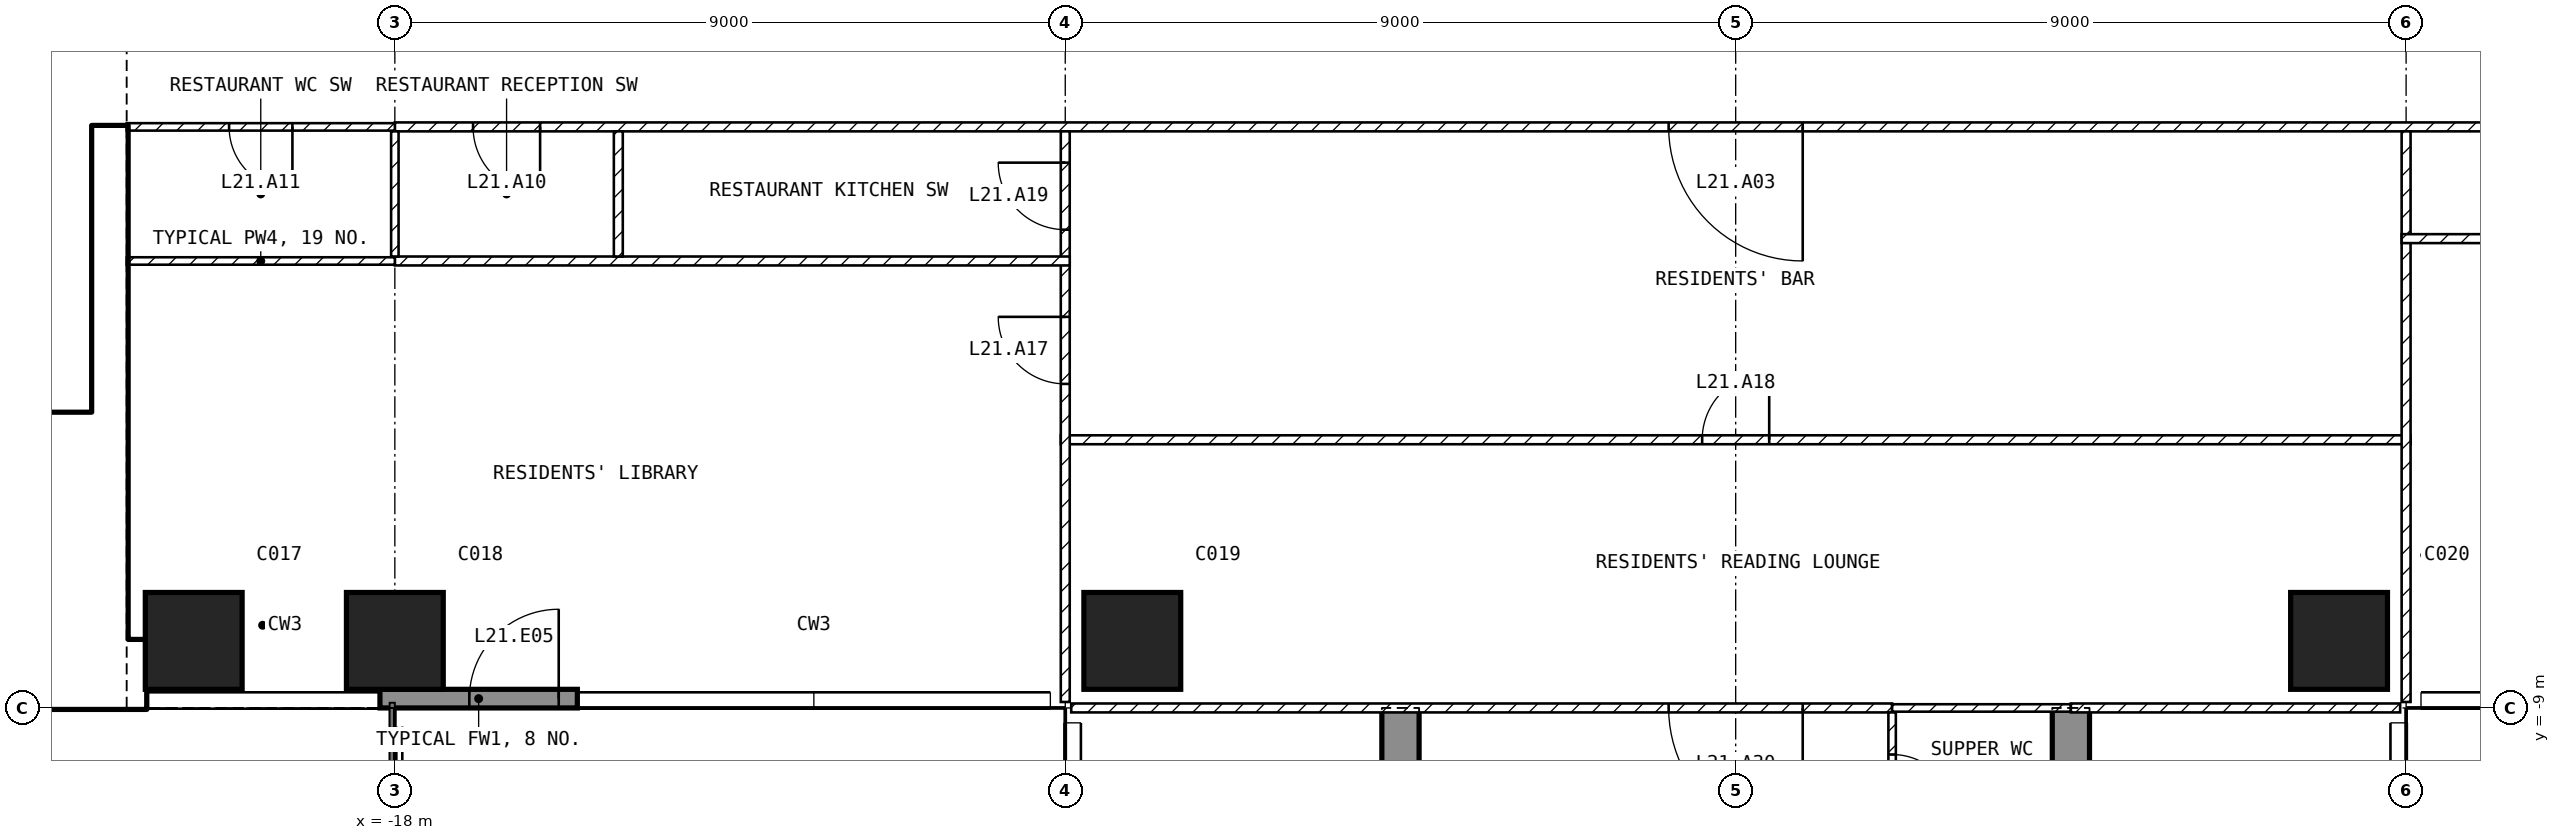
"""IFC4 building model, lengths in metres.
Left out: names, types, materials, properties, quantities, classifications, styles, units other than length and angle.
Written with IfcOpenShell. Run it as: python <this file> out.ifc"""

import sys

from ifc_helpers import new_model, si_unit, direction, frame, frame_2d, origin, origin_2d, place, context, subcontext, project, spatial, polyline, rectangle, outline, extrude, element, fill, save


model = new_model("IFC4")
c1 = context("Model", 3, precision=1e-05, world=origin(), true_north=direction((0.0, 1.0)))
c2 = subcontext(c1, "Body", "Model", "MODEL_VIEW")
j1 = project(units=[si_unit("LENGTHUNIT", "METRE"), si_unit("PLANEANGLEUNIT", "RADIAN")], contexts=[c1])
p1 = place(None, origin())
s1 = spatial("IfcSite", under=j1, at=p1, CompositionType="ELEMENT")
p2 = place(p1, origin())
s2 = spatial("IfcBuilding", under=s1, at=p2, CompositionType="ELEMENT")
p3 = place(p2, frame((0.0, 0.0, 92.5)))
s3 = spatial("IfcBuildingStorey", under=s2, at=p3, CompositionType="ELEMENT", Elevation=92.5)
for number, where, z_axis, x_axis in (
    (1, (-20.7, -8.1, -0.3), (0.0, 0.0, 1.0), (1.0, 0.0, 0.0)),
    (2, (-18.0, -8.1, -0.3), (0.0, 0.0, 1.0), (1.0, 0.0, 0.0)),
    (3, (-8.1, -8.1, -0.3), (0.0, 0.0, 1.0), (1.0, 0.0, 0.0)),
    (4, (8.1, -8.1, -0.3), (0.0, 0.0, 1.0), (1.0, 0.0, 0.0)),
):
    element("IfcColumn", number, at=place(p3, frame(where, z_axis=z_axis, x_axis=x_axis)), inside=s3, PredefinedType="COLUMN", context=c2, shape_type="SweptSolid", body=[
        extrude(rectangle(XDim=1.3, YDim=1.3, at=origin_2d()), origin(), (0.0, 0.0, 1.0), 5.25),
    ])
for number, where, z_axis, x_axis in (
    (5, (-4.75, -25.45, -0.3), (1.0, 0.0, 0.0), (0.0, 1.0, 0.0)),
    (6, (4.25, -25.45, -0.3), (1.0, 0.0, 0.0), (0.0, 1.0, 0.0)),
):
    element("IfcWall", number, at=place(p3, frame(where, z_axis=z_axis, x_axis=x_axis)), inside=s3, PredefinedType="SHEAR", context=c2, shape_type="SweptSolid", body=[
        extrude(outline(polyline([(0.0, 0.0), (4.15, 0.0), (4.15, 2.7), (6.55, 2.7), (6.55, 0.0), (11.95, 0.0), (11.95, 2.7), (14.35, 2.7), (14.35, 0.0), (16.45, 0.0), (16.45, 5.25), (0.0, 5.25), (0.0, 0.0)])), origin(), (0.0, 0.0, 1.0), 0.5),
    ])
p4 = place(p3, frame((-18.2, -8.875, 0.0), z_axis=(0.0, 0.0, 1.0), x_axis=(1.0, 0.0, 0.0)))
e7 = element("IfcWall", 7, at=p4, inside=s3, PredefinedType="SOLIDWALL", context=c2, shape_type="SweptSolid", body=[
    extrude(rectangle(XDim=2.65, YDim=0.25, at=frame_2d((1.325, 0.0))), origin(), (0.0, 0.0, 1.0), 4.95),
])
p5 = place(p4, frame((1.2, 0.0, 0.0)))
e8 = element("IfcOpeningElement", 8, at=p5, cuts=e7, PredefinedType="OPENING", context=c2, shape_type="SweptSolid", body=[
    extrude(rectangle(XDim=1.2, YDim=2.4, at=frame_2d((0.6, 1.2))), frame((0.0, 0.135, 0.0), z_axis=(0.0, -1.0, 0.0), x_axis=(1.0, 0.0, 0.0)), (0.0, 0.0, 1.0), 0.27),
])
p6 = place(p3, frame((-32.4, -8.55, 0.0), z_axis=(0.0, 0.0, 1.0), x_axis=(1.0, 0.0, 0.0)))
e9 = element("IfcWall", 9, at=p6, inside=s3, PredefinedType="SHEAR", context=c2, shape_type="SweptSolid", body=[
    extrude(rectangle(XDim=11.05, YDim=0.9, at=frame_2d((5.525, 0.0))), origin(), (0.0, 0.0, 1.0), 4.95),
])
p7 = place(p3, frame((-21.825, -8.1, 0.0), z_axis=(0.0, 0.0, 1.0), x_axis=(0.0, 1.0, 0.0)))
e10 = element("IfcWall", 10, at=p7, inside=s3, PredefinedType="SHEAR", context=c2, shape_type="SweptSolid", body=[
    extrude(rectangle(XDim=6.9, YDim=0.45, at=frame_2d((3.45, 0.0))), origin(), (0.0, 0.0, 1.0), 4.95),
])
p8 = place(p3, frame((-28.35, -5.15, 0.0), z_axis=(0.0, 0.0, 1.0), x_axis=(1.0, 0.0, 0.0)))
e11 = element("IfcWall", 11, at=p8, inside=s3, PredefinedType="SOLIDWALL", context=c2, shape_type="SweptSolid", body=[
    extrude(rectangle(XDim=6.3, YDim=0.2, at=frame_2d((3.15, 0.0))), origin(), (0.0, 0.0, 1.0), 4.95),
])
p9 = place(p8, frame((5.1, 0.0, 0.0)))
e12 = element("IfcOpeningElement", 12, at=p9, cuts=e11, PredefinedType="OPENING", context=c2, shape_type="SweptSolid", body=[
    extrude(rectangle(XDim=1.0, YDim=2.1, at=frame_2d((0.5, 1.05))), frame((0.0, 0.11, 0.0), z_axis=(0.0, -1.0, 0.0), x_axis=(1.0, 0.0, 0.0)), (0.0, 0.0, 1.0), 0.22),
])
p10 = place(p3, frame((18.0, -1.2, 0.0), z_axis=(0.0, 0.0, 1.0), x_axis=(-1.0, 0.0, 0.0)))
e13 = element("IfcWall", 13, at=p10, inside=s3, PredefinedType="PARTITIONING", context=c2, shape_type="SweptSolid", body=[
    extrude(rectangle(XDim=36.0, YDim=0.12, at=frame_2d((18.0, 0.0))), origin(), (0.0, 0.0, 1.0), 4.95),
])
p11 = place(p10, frame((17.1, 0.0, 0.0)))
e14 = element("IfcOpeningElement", 14, at=p11, cuts=e13, PredefinedType="OPENING", context=c2, shape_type="SweptSolid", body=[
    extrude(rectangle(XDim=1.8, YDim=2.1, at=frame_2d((0.9, 1.05))), frame((0.0, 0.07, 0.0), z_axis=(0.0, -1.0, 0.0), x_axis=(1.0, 0.0, 0.0)), (0.0, 0.0, 1.0), 0.14),
])
p12 = place(p10, frame((5.25, 0.0, 0.0)))
e15 = element("IfcOpeningElement", 15, at=p12, cuts=e13, PredefinedType="OPENING", context=c2, shape_type="SweptSolid", body=[
    extrude(rectangle(XDim=0.9, YDim=2.1, at=frame_2d((0.45, 1.05))), frame((0.0, 0.07, 0.0), z_axis=(0.0, -1.0, 0.0), x_axis=(1.0, 0.0, 0.0)), (0.0, 0.0, 1.0), 0.14),
])
p13 = place(p10, frame((34.05, 0.0, 0.0)))
e16 = element("IfcOpeningElement", 16, at=p13, cuts=e13, PredefinedType="OPENING", context=c2, shape_type="SweptSolid", body=[
    extrude(rectangle(XDim=0.9, YDim=2.1, at=frame_2d((0.45, 1.05))), frame((0.0, 0.07, 0.0), z_axis=(0.0, -1.0, 0.0), x_axis=(1.0, 0.0, 0.0)), (0.0, 0.0, 1.0), 0.14),
])
p14 = place(p3, frame((-18.0, -1.2, 0.0), z_axis=(0.0, 0.0, 1.0), x_axis=(-1.0, 0.0, 0.0)))
e17 = element("IfcWall", 17, at=p14, inside=s3, PredefinedType="PARTITIONING", context=c2, shape_type="SweptSolid", body=[
    extrude(rectangle(XDim=3.6, YDim=0.1, at=frame_2d((1.8, 0.0))), origin(), (0.0, 0.0, 1.0), 4.95),
])
p15 = place(p14, frame((1.375, 0.0, 0.0)))
e18 = element("IfcOpeningElement", 18, at=p15, cuts=e17, PredefinedType="OPENING", context=c2, shape_type="SweptSolid", body=[
    extrude(rectangle(XDim=0.85, YDim=2.1, at=frame_2d((0.425, 1.05))), frame((0.0, 0.06, 0.0), z_axis=(0.0, -1.0, 0.0), x_axis=(1.0, 0.0, 0.0)), (0.0, 0.0, 1.0), 0.12),
])
p16 = place(p3, frame((-9.06, -5.4, 0.0), z_axis=(0.0, 0.0, 1.0), x_axis=(1.0, 0.0, 0.0)))
e19 = element("IfcWall", 19, at=p16, inside=s3, PredefinedType="PARTITIONING", context=c2, shape_type="SweptSolid", body=[
    extrude(rectangle(XDim=18.12, YDim=0.12, at=frame_2d((9.06, 0.0))), origin(), (0.0, 0.0, 1.0), 4.95),
])
p17 = place(p16, frame((8.61, 0.0, 0.0)))
e20 = element("IfcOpeningElement", 20, at=p17, cuts=e19, PredefinedType="OPENING", context=c2, shape_type="SweptSolid", body=[
    extrude(rectangle(XDim=0.9, YDim=2.1, at=frame_2d((0.45, 1.05))), frame((0.0, 0.07, 0.0), z_axis=(0.0, -1.0, 0.0), x_axis=(1.0, 0.0, 0.0)), (0.0, 0.0, 1.0), 0.14),
])
p18 = place(p3, frame((9.0, -1.26, 0.0), z_axis=(0.0, 0.0, 1.0), x_axis=(0.0, -1.0, 0.0)))
e21 = element("IfcWall", 21, at=p18, inside=s3, PredefinedType="PARTITIONING", context=c2, shape_type="SweptSolid", body=[
    extrude(rectangle(XDim=7.66, YDim=0.12, at=frame_2d((3.83, 0.0))), origin(), (0.0, 0.0, 1.0), 4.95),
])
p19 = place(p3, frame((-9.0, -8.92, 0.0), z_axis=(0.0, 0.0, 1.0), x_axis=(0.0, 1.0, 0.0)))
e22 = element("IfcWall", 22, at=p19, inside=s3, PredefinedType="PARTITIONING", context=c2, shape_type="SweptSolid", body=[
    extrude(rectangle(XDim=7.66, YDim=0.12, at=frame_2d((3.83, 0.0))), origin(), (0.0, 0.0, 1.0), 4.95),
])
p20 = place(p19, frame((4.27, 0.0, 0.0)))
e23 = element("IfcOpeningElement", 23, at=p20, cuts=e22, PredefinedType="OPENING", context=c2, shape_type="SweptSolid", body=[
    extrude(rectangle(XDim=0.9, YDim=2.1, at=frame_2d((0.45, 1.05))), frame((0.0, 0.07, 0.0), z_axis=(0.0, -1.0, 0.0), x_axis=(1.0, 0.0, 0.0)), (0.0, 0.0, 1.0), 0.14),
])
p21 = place(p19, frame((6.34, 0.0, 0.0)))
e24 = element("IfcOpeningElement", 24, at=p21, cuts=e22, PredefinedType="OPENING", context=c2, shape_type="SweptSolid", body=[
    extrude(rectangle(XDim=0.9, YDim=2.1, at=frame_2d((0.45, 1.05))), frame((0.0, 0.07, 0.0), z_axis=(0.0, -1.0, 0.0), x_axis=(1.0, 0.0, 0.0)), (0.0, 0.0, 1.0), 0.14),
])
p22 = place(p3, frame((2.1, -9.0, 0.0), z_axis=(0.0, 0.0, 1.0), x_axis=(-1.0, 0.0, 0.0)))
e25 = element("IfcWall", 25, at=p22, inside=s3, PredefinedType="PARTITIONING", context=c2, shape_type="SweptSolid", body=[
    extrude(rectangle(XDim=11.02, YDim=0.12, at=frame_2d((5.51, 0.0))), origin(), (0.0, 0.0, 1.0), 4.95),
])
p23 = place(p22, frame((1.2, 0.0, 0.0)))
e26 = element("IfcOpeningElement", 26, at=p23, cuts=e25, PredefinedType="OPENING", context=c2, shape_type="SweptSolid", body=[
    extrude(rectangle(XDim=1.8, YDim=2.1, at=frame_2d((0.9, 1.05))), frame((0.0, 0.07, 0.0), z_axis=(0.0, -1.0, 0.0), x_axis=(1.0, 0.0, 0.0)), (0.0, 0.0, 1.0), 0.14),
])
p24 = place(p3, frame((4.5, -9.0, 0.0), z_axis=(0.0, 0.0, 1.0), x_axis=(-1.0, 0.0, 0.0)))
e27 = element("IfcWall", 27, at=p24, inside=s3, PredefinedType="PARTITIONING", context=c2, shape_type="SweptSolid", body=[
    extrude(rectangle(XDim=2.4, YDim=0.1, at=frame_2d((1.2, 0.0))), origin(), (0.0, 0.0, 1.0), 4.95),
])
p25 = place(p3, frame((8.92, -9.0, 0.0), z_axis=(0.0, 0.0, 1.0), x_axis=(-1.0, 0.0, 0.0)))
e28 = element("IfcWall", 28, at=p25, inside=s3, PredefinedType="PARTITIONING", context=c2, shape_type="SweptSolid", body=[
    extrude(rectangle(XDim=4.42, YDim=0.12, at=frame_2d((2.21, 0.0))), origin(), (0.0, 0.0, 1.0), 4.95),
])
p26 = place(p3, frame((8.94, -2.7, 0.0), z_axis=(0.0, 0.0, 1.0), x_axis=(1.0, 0.0, 0.0)))
e29 = element("IfcWall", 29, at=p26, inside=s3, PredefinedType="PARTITIONING", context=c2, shape_type="SweptSolid", body=[
    extrude(rectangle(XDim=9.06, YDim=0.12, at=frame_2d((4.53, 0.0))), origin(), (0.0, 0.0, 1.0), 4.95),
])
p27 = place(p26, frame((2.91, 0.0, 0.0)))
e30 = element("IfcOpeningElement", 30, at=p27, cuts=e29, PredefinedType="OPENING", context=c2, shape_type="SweptSolid", body=[
    extrude(rectangle(XDim=0.9, YDim=2.1, at=frame_2d((0.45, 1.05))), frame((0.0, 0.07, 0.0), z_axis=(0.0, -1.0, 0.0), x_axis=(1.0, 0.0, 0.0)), (0.0, 0.0, 1.0), 0.14),
])
p28 = place(p3, frame((-18.0, -3.0, 0.0), z_axis=(0.0, 0.0, 1.0), x_axis=(1.0, 0.0, 0.0)))
e31 = element("IfcWall", 31, at=p28, inside=s3, PredefinedType="PARTITIONING", context=c2, shape_type="SweptSolid", body=[
    extrude(rectangle(XDim=9.06, YDim=0.12, at=frame_2d((4.53, 0.0))), origin(), (0.0, 0.0, 1.0), 4.95),
])
p29 = place(p3, frame((-21.6, -3.0, 0.0), z_axis=(0.0, 0.0, 1.0), x_axis=(1.0, 0.0, 0.0)))
e32 = element("IfcWall", 32, at=p29, inside=s3, PredefinedType="PARTITIONING", context=c2, shape_type="SweptSolid", body=[
    extrude(rectangle(XDim=3.6, YDim=0.1, at=frame_2d((1.8, 0.0))), origin(), (0.0, 0.0, 1.0), 4.95),
])
p30 = place(p3, frame((-15.0, -2.94, 0.0), z_axis=(0.0, 0.0, 1.0), x_axis=(0.0, 1.0, 0.0)))
e33 = element("IfcWall", 33, at=p30, inside=s3, PredefinedType="PARTITIONING", context=c2, shape_type="SweptSolid", body=[
    extrude(rectangle(XDim=1.68, YDim=0.12, at=frame_2d((0.84, 0.0))), origin(), (0.0, 0.0, 1.0), 4.95),
])
p31 = place(p3, frame((-18.0, -2.94, 0.0), z_axis=(0.0, 0.0, 1.0), x_axis=(0.0, 1.0, 0.0)))
e34 = element("IfcWall", 34, at=p31, inside=s3, PredefinedType="PARTITIONING", context=c2, shape_type="SweptSolid", body=[
    extrude(rectangle(XDim=1.68, YDim=0.1, at=frame_2d((0.84, 0.0))), origin(), (0.0, 0.0, 1.0), 4.046),
])
p32 = place(p3, frame((2.1, -9.06, 0.0), z_axis=(0.0, 0.0, 1.0), x_axis=(0.0, -1.0, 0.0)))
e35 = element("IfcWall", 35, at=p32, inside=s3, PredefinedType="PARTITIONING", context=c2, shape_type="SweptSolid", body=[
    extrude(rectangle(XDim=1.98, YDim=0.1, at=frame_2d((0.99, 0.0))), origin(), (0.0, 0.0, 1.0), 4.95),
])
p33 = place(p32, frame((0.565, 0.0, 0.0)))
e36 = element("IfcOpeningElement", 36, at=p33, cuts=e35, PredefinedType="OPENING", context=c2, shape_type="SweptSolid", body=[
    extrude(rectangle(XDim=0.85, YDim=2.1, at=frame_2d((0.425, 1.05))), frame((0.0, 0.06, 0.0), z_axis=(0.0, -1.0, 0.0), x_axis=(1.0, 0.0, 0.0)), (0.0, 0.0, 1.0), 0.12),
])
p34 = place(p5, origin())
e37 = element("IfcDoor", 37, at=p34, inside=s3, OperationType="SINGLE_SWING_RIGHT", PredefinedType="DOOR", context=c2, shape_type="SweptSolid", body=[
    extrude(rectangle(XDim=1.2, YDim=2.4, at=frame_2d((0.6, 1.2))), frame((0.0, 0.025, 0.0), z_axis=(0.0, -1.0, 0.0), x_axis=(1.0, 0.0, 0.0)), (0.0, 0.0, 1.0), 0.05),
])
fill(e8, e37)
p35 = place(p9, origin())
e38 = element("IfcDoor", 38, at=p35, inside=s3, OperationType="SINGLE_SWING_LEFT", PredefinedType="DOOR", context=c2, shape_type="SweptSolid", body=[
    extrude(rectangle(XDim=1.0, YDim=2.1, at=frame_2d((0.5, 1.05))), frame((0.0, 0.025, 0.0), z_axis=(0.0, -1.0, 0.0), x_axis=(1.0, 0.0, 0.0)), (0.0, 0.0, 1.0), 0.05),
])
fill(e12, e38)
p36 = place(p11, origin())
e39 = element("IfcDoor", 39, at=p36, inside=s3, OperationType="SINGLE_SWING_LEFT", PredefinedType="DOOR", context=c2, shape_type="SweptSolid", body=[
    extrude(rectangle(XDim=1.8, YDim=2.1, at=frame_2d((0.9, 1.05))), frame((0.0, 0.025, 0.0), z_axis=(0.0, -1.0, 0.0), x_axis=(1.0, 0.0, 0.0)), (0.0, 0.0, 1.0), 0.05),
])
fill(e14, e39)
p37 = place(p13, origin())
e40 = element("IfcDoor", 40, at=p37, inside=s3, OperationType="SINGLE_SWING_LEFT", PredefinedType="DOOR", context=c2, shape_type="SweptSolid", body=[
    extrude(rectangle(XDim=0.9, YDim=2.1, at=frame_2d((0.45, 1.05))), frame((0.0, 0.025, 0.0), z_axis=(0.0, -1.0, 0.0), x_axis=(1.0, 0.0, 0.0)), (0.0, 0.0, 1.0), 0.05),
])
fill(e16, e40)
p38 = place(p15, origin())
e41 = element("IfcDoor", 41, at=p38, inside=s3, OperationType="SINGLE_SWING_LEFT", PredefinedType="DOOR", context=c2, shape_type="SweptSolid", body=[
    extrude(rectangle(XDim=0.85, YDim=2.1, at=frame_2d((0.425, 1.05))), frame((0.0, 0.025, 0.0), z_axis=(0.0, -1.0, 0.0), x_axis=(1.0, 0.0, 0.0)), (0.0, 0.0, 1.0), 0.05),
])
fill(e18, e41)
p39 = place(p20, origin())
e42 = element("IfcDoor", 42, at=p39, inside=s3, OperationType="SINGLE_SWING_RIGHT", PredefinedType="DOOR", context=c2, shape_type="SweptSolid", body=[
    extrude(rectangle(XDim=0.9, YDim=2.1, at=frame_2d((0.45, 1.05))), frame((0.0, 0.025, 0.0), z_axis=(0.0, -1.0, 0.0), x_axis=(1.0, 0.0, 0.0)), (0.0, 0.0, 1.0), 0.05),
])
fill(e23, e42)
p40 = place(p17, origin())
e43 = element("IfcDoor", 43, at=p40, inside=s3, OperationType="SINGLE_SWING_RIGHT", PredefinedType="DOOR", context=c2, shape_type="SweptSolid", body=[
    extrude(rectangle(XDim=0.9, YDim=2.1, at=frame_2d((0.45, 1.05))), frame((0.0, 0.025, 0.0), z_axis=(0.0, -1.0, 0.0), x_axis=(1.0, 0.0, 0.0)), (0.0, 0.0, 1.0), 0.05),
])
fill(e20, e43)
p41 = place(p21, origin())
e44 = element("IfcDoor", 44, at=p41, inside=s3, OperationType="SINGLE_SWING_RIGHT", PredefinedType="DOOR", context=c2, shape_type="SweptSolid", body=[
    extrude(rectangle(XDim=0.9, YDim=2.1, at=frame_2d((0.45, 1.05))), frame((0.0, 0.025, 0.0), z_axis=(0.0, -1.0, 0.0), x_axis=(1.0, 0.0, 0.0)), (0.0, 0.0, 1.0), 0.05),
])
fill(e24, e44)
p42 = place(p23, origin())
e45 = element("IfcDoor", 45, at=p42, inside=s3, OperationType="SINGLE_SWING_LEFT", PredefinedType="DOOR", context=c2, shape_type="SweptSolid", body=[
    extrude(rectangle(XDim=1.8, YDim=2.1, at=frame_2d((0.9, 1.05))), frame((0.0, 0.025, 0.0), z_axis=(0.0, -1.0, 0.0), x_axis=(1.0, 0.0, 0.0)), (0.0, 0.0, 1.0), 0.05),
])
fill(e26, e45)
p43 = place(p33, origin())
e46 = element("IfcDoor", 46, at=p43, inside=s3, OperationType="SINGLE_SWING_RIGHT", PredefinedType="DOOR", context=c2, shape_type="SweptSolid", body=[
    extrude(rectangle(XDim=0.85, YDim=2.1, at=frame_2d((0.425, 1.05))), frame((0.0, 0.025, 0.0), z_axis=(0.0, -1.0, 0.0), x_axis=(1.0, 0.0, 0.0)), (0.0, 0.0, 1.0), 0.05),
])
fill(e36, e46)
save(model, sys.argv[1])
